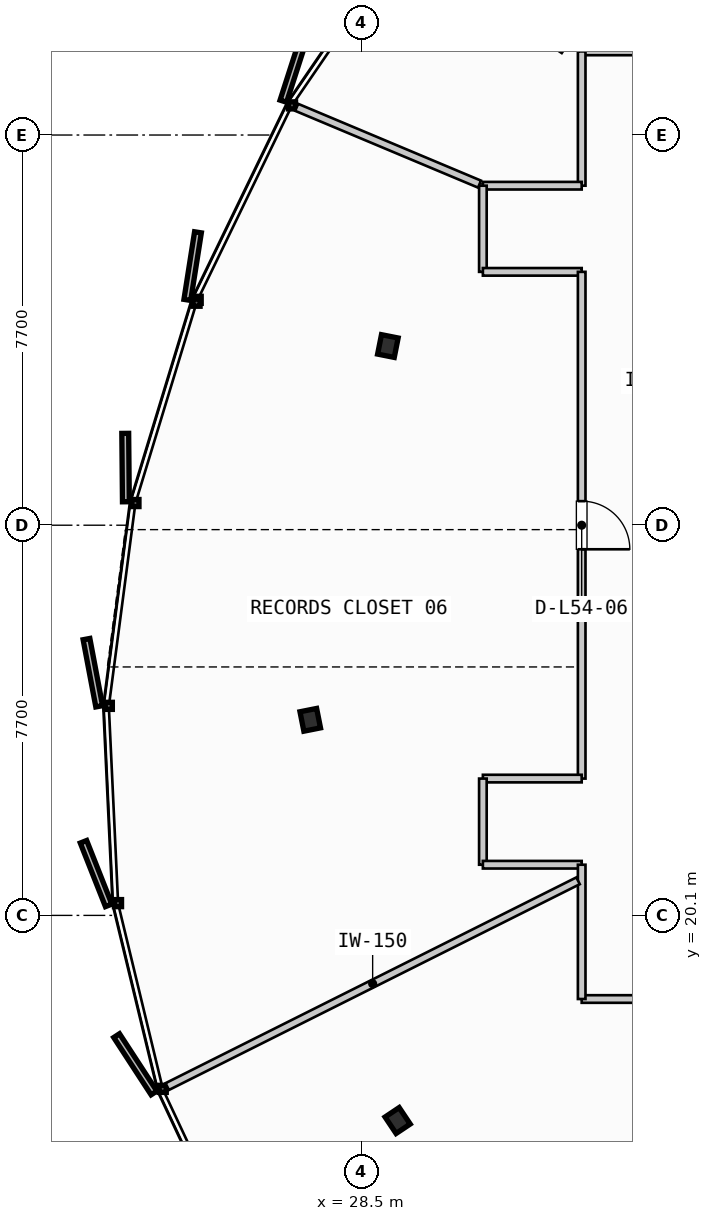
"""IFC4 building model, lengths in metres.
Left out: names, types, materials, properties, quantities, classifications, styles, units other than length and angle.
Written with IfcOpenShell. Run it as: python <this file> out.ifc"""

import sys

from ifc_helpers import new_model, si_unit, direction, frame, frame_2d, origin, origin_2d, place, context, subcontext, project, spatial, rectangle, i_section, extrude, source, transform, mapped, element, fill, save


model = new_model("IFC4")
c1 = context("Model", 3, precision=1e-05, world=origin(), true_north=direction((0.0, 1.0)))
c2 = subcontext(c1, "Body", "Model", "MODEL_VIEW")
j1 = project(units=[si_unit("LENGTHUNIT", "METRE"), si_unit("PLANEANGLEUNIT", "RADIAN")], contexts=[c1])
p1 = place(None, origin())
s1 = spatial("IfcSite", under=j1, at=p1, CompositionType="ELEMENT")
p2 = place(p1, origin())
s2 = spatial("IfcBuilding", under=s1, at=p2, CompositionType="ELEMENT")
p3 = place(p2, frame((0.0, 0.0, 207.9)))
s3 = spatial("IfcBuildingStorey", under=s2, at=p3, CompositionType="ELEMENT", Elevation=207.9)
m1 = source(origin(), c2, "Body", "SweptSolid", [
    extrude(i_section(OverallWidth=0.391, OverallDepth=0.335, WebThickness=0.023, FlangeThickness=0.034, FilletRadius=0.015, at=origin_2d()), origin(), (0.0, 0.0, 1.0), 3.26),
])
for number, where, z_axis, x_axis in (
    (1, (29.025, 31.336, 0.0), (0.0, 0.0, 1.0), (-0.981, 0.195, 0.0)),
    (2, (27.493, 23.96, 0.0), (0.0, 0.0, 1.0), (-0.981, -0.195, 0.0)),
    (3, (29.218, 16.052, 0.0), (0.0, 0.0, 1.0), (-0.831, -0.556, 0.0)),
):
    element("IfcColumn", number, at=place(p3, frame(where, z_axis=z_axis, x_axis=x_axis)), inside=s3, PredefinedType="COLUMN", context=c2, shape_type="MappedRepresentation", body=[
        mapped(m1, transform((0.0, 0.0, 0.0), scale=1.0)),
    ])
p4 = place(p3, frame((32.85, 18.45, 0.0), z_axis=(0.0, 0.0, 1.0), x_axis=(1.0, 0.0, 0.0)))
e4 = element("IfcWall", 4, at=p4, inside=s3, PredefinedType="PARTITIONING", context=c2, shape_type="SweptSolid", body=[
    extrude(rectangle(XDim=28.35, YDim=0.15, at=frame_2d((14.175, 0.0))), origin(), (0.0, 0.0, 1.0), 2.455),
])
p5 = place(p4, frame((4.951, 0.0, 0.0)))
e5 = element("IfcOpeningElement", 5, at=p5, cuts=e4, PredefinedType="OPENING", context=c2, shape_type="SweptSolid", body=[
    extrude(rectangle(XDim=0.95, YDim=2.15, at=frame_2d((0.475, 1.075))), frame((0.0, 0.085, 0.0), z_axis=(0.0, -1.0, 0.0), x_axis=(1.0, 0.0, 0.0)), (0.0, 0.0, 1.0), 0.17),
])
p6 = place(p4, frame((18.536, 0.0, 0.0)))
e6 = element("IfcOpeningElement", 6, at=p6, cuts=e4, PredefinedType="OPENING", context=c2, shape_type="SweptSolid", body=[
    extrude(rectangle(XDim=0.95, YDim=2.15, at=frame_2d((0.475, 1.075))), frame((0.0, 0.085, 0.0), z_axis=(0.0, -1.0, 0.0), x_axis=(1.0, 0.0, 0.0)), (0.0, 0.0, 1.0), 0.17),
])
p7 = place(p3, frame((61.2, 37.15, 0.0), z_axis=(0.0, 0.0, 1.0), x_axis=(-1.0, 0.0, 0.0)))
e7 = element("IfcWall", 7, at=p7, inside=s3, PredefinedType="PARTITIONING", context=c2, shape_type="SweptSolid", body=[
    extrude(rectangle(XDim=28.35, YDim=0.15, at=frame_2d((14.175, 0.0))), origin(), (0.0, 0.0, 1.0), 2.455),
])
p8 = place(p7, frame((13.7, 0.0, 0.0)))
e8 = element("IfcOpeningElement", 8, at=p8, cuts=e7, PredefinedType="OPENING", context=c2, shape_type="SweptSolid", body=[
    extrude(rectangle(XDim=0.95, YDim=2.15, at=frame_2d((0.475, 1.075))), frame((0.0, 0.085, 0.0), z_axis=(0.0, -1.0, 0.0), x_axis=(1.0, 0.0, 0.0)), (0.0, 0.0, 1.0), 0.17),
])
p9 = place(p3, frame((32.85, 37.15, 0.0), z_axis=(0.0, 0.0, 1.0), x_axis=(0.0, -1.0, 0.0)))
e9 = element("IfcWall", 9, at=p9, inside=s3, PredefinedType="PARTITIONING", context=c2, shape_type="SweptSolid", body=[
    extrude(rectangle(XDim=2.65, YDim=0.15, at=frame_2d((1.325, 0.0))), origin(), (0.0, 0.0, 1.0), 2.455),
])
p10 = place(p3, frame((32.85, 34.5, 0.0), z_axis=(0.0, 0.0, 1.0), x_axis=(-1.0, 0.0, 0.0)))
e10 = element("IfcWall", 10, at=p10, inside=s3, PredefinedType="PARTITIONING", context=c2, shape_type="SweptSolid", body=[
    extrude(rectangle(XDim=1.95, YDim=0.15, at=frame_2d((0.975, 0.0))), origin(), (0.0, 0.0, 1.0), 2.455),
])
p11 = place(p3, frame((30.9, 34.5, 0.0), z_axis=(0.0, 0.0, 1.0), x_axis=(0.0, -1.0, 0.0)))
e11 = element("IfcWall", 11, at=p11, inside=s3, PredefinedType="PARTITIONING", context=c2, shape_type="SweptSolid", body=[
    extrude(rectangle(XDim=1.7, YDim=0.15, at=frame_2d((0.85, 0.0))), origin(), (0.0, 0.0, 1.0), 2.455),
])
p12 = place(p3, frame((30.9, 32.8, 0.0), z_axis=(0.0, 0.0, 1.0), x_axis=(1.0, 0.0, 0.0)))
e12 = element("IfcWall", 12, at=p12, inside=s3, PredefinedType="PARTITIONING", context=c2, shape_type="SweptSolid", body=[
    extrude(rectangle(XDim=1.95, YDim=0.15, at=frame_2d((0.975, 0.0))), origin(), (0.0, 0.0, 1.0), 2.455),
])
p13 = place(p3, frame((32.85, 32.8, 0.0), z_axis=(0.0, 0.0, 1.0), x_axis=(0.0, -1.0, 0.0)))
e13 = element("IfcWall", 13, at=p13, inside=s3, PredefinedType="PARTITIONING", context=c2, shape_type="SweptSolid", body=[
    extrude(rectangle(XDim=10.0, YDim=0.15, at=frame_2d((5.0, 0.0))), origin(), (0.0, 0.0, 1.0), 2.455),
])
p14 = place(p13, frame((4.525, 0.0, 0.0)))
e14 = element("IfcOpeningElement", 14, at=p14, cuts=e13, PredefinedType="OPENING", context=c2, shape_type="SweptSolid", body=[
    extrude(rectangle(XDim=0.95, YDim=2.15, at=frame_2d((0.475, 1.075))), frame((0.0, 0.085, 0.0), z_axis=(0.0, -1.0, 0.0), x_axis=(1.0, 0.0, 0.0)), (0.0, 0.0, 1.0), 0.17),
])
p15 = place(p3, frame((32.85, 22.8, 0.0), z_axis=(0.0, 0.0, 1.0), x_axis=(-1.0, 0.0, 0.0)))
e15 = element("IfcWall", 15, at=p15, inside=s3, PredefinedType="PARTITIONING", context=c2, shape_type="SweptSolid", body=[
    extrude(rectangle(XDim=1.95, YDim=0.15, at=frame_2d((0.975, 0.0))), origin(), (0.0, 0.0, 1.0), 2.455),
])
p16 = place(p3, frame((30.9, 22.8, 0.0), z_axis=(0.0, 0.0, 1.0), x_axis=(0.0, -1.0, 0.0)))
e16 = element("IfcWall", 16, at=p16, inside=s3, PredefinedType="PARTITIONING", context=c2, shape_type="SweptSolid", body=[
    extrude(rectangle(XDim=1.7, YDim=0.15, at=frame_2d((0.85, 0.0))), origin(), (0.0, 0.0, 1.0), 2.455),
])
p17 = place(p3, frame((30.9, 21.1, 0.0), z_axis=(0.0, 0.0, 1.0), x_axis=(1.0, 0.0, 0.0)))
e17 = element("IfcWall", 17, at=p17, inside=s3, PredefinedType="PARTITIONING", context=c2, shape_type="SweptSolid", body=[
    extrude(rectangle(XDim=1.95, YDim=0.15, at=frame_2d((0.975, 0.0))), origin(), (0.0, 0.0, 1.0), 2.455),
])
p18 = place(p3, frame((32.85, 21.1, 0.0), z_axis=(0.0, 0.0, 1.0), x_axis=(0.0, -1.0, 0.0)))
e18 = element("IfcWall", 18, at=p18, inside=s3, PredefinedType="PARTITIONING", context=c2, shape_type="SweptSolid", body=[
    extrude(rectangle(XDim=2.65, YDim=0.15, at=frame_2d((1.325, 0.0))), origin(), (0.0, 0.0, 1.0), 2.455),
])
p19 = place(p3, frame((32.779, 20.783, 0.0), z_axis=(0.0, 0.0, 1.0), x_axis=(-0.894120064927, -0.447827321068, 0.0)))
e19 = element("IfcWall", 19, at=p19, inside=s3, PredefinedType="PARTITIONING", context=c2, shape_type="SweptSolid", body=[
    extrude(rectangle(XDim=9.068, YDim=0.15, at=frame_2d((4.534, 0.0))), origin(), (0.0, 0.0, 1.0), 2.455),
])
p20 = place(p3, frame((30.834, 34.531, 0.0), z_axis=(0.0, 0.0, 1.0), x_axis=(-0.922004819601, 0.387178398976, 0.0)))
e20 = element("IfcWall", 20, at=p20, inside=s3, PredefinedType="PARTITIONING", context=c2, shape_type="SweptSolid", body=[
    extrude(rectangle(XDim=3.914, YDim=0.15, at=frame_2d((1.957, 0.0))), origin(), (0.0, 0.0, 1.0), 2.455),
])
m2 = source(origin(), c2, "Body", "SweptSolid", [
    extrude(rectangle(XDim=0.95, YDim=2.15, at=frame_2d((0.475, 1.075))), frame((0.0, 0.025, 0.0), z_axis=(0.0, -1.0, 0.0), x_axis=(1.0, 0.0, 0.0)), (0.0, 0.0, 1.0), 0.05),
])
p21 = place(p14, origin())
e21 = element("IfcDoor", 21, at=p21, inside=s3, OperationType="SINGLE_SWING_RIGHT", PredefinedType="DOOR", context=c2, shape_type="MappedRepresentation", body=[
    mapped(m2, transform((0.0, 0.0, 0.0), scale=1.0)),
])
fill(e14, e21)
save(model, sys.argv[1])
